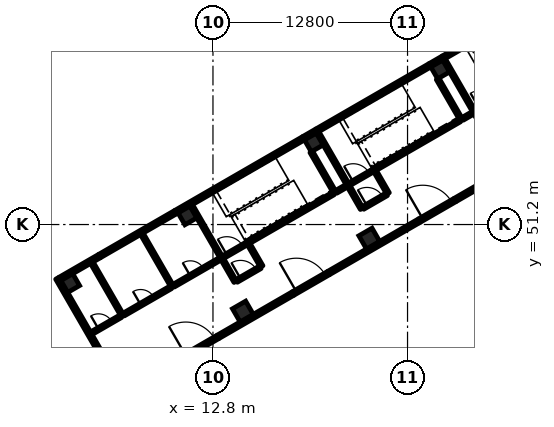
"""IFC4 building model, lengths in metres.
Left out: names, types, materials, properties, quantities, classifications, styles, units other than length and angle.
Written with IfcOpenShell. Run it as: python <this file> out.ifc"""

import sys

from ifc_helpers import new_model, si_unit, direction, frame, frame_2d, origin, origin_2d, place, context, subcontext, project, spatial, rectangle, extrude, element, fill, save


model = new_model("IFC4")
c1 = context("Model", 3, precision=1e-05, world=origin(), true_north=direction((0.0, 1.0)))
c2 = subcontext(c1, "Body", "Model", "MODEL_VIEW")
j1 = project(units=[si_unit("LENGTHUNIT", "METRE"), si_unit("PLANEANGLEUNIT", "RADIAN")], contexts=[c1])
p1 = place(None, origin())
s1 = spatial("IfcSite", under=j1, at=p1, CompositionType="ELEMENT")
p2 = place(p1, origin())
s2 = spatial("IfcBuilding", under=s1, at=p2, CompositionType="ELEMENT")
p3 = place(p2, frame((0.0, 0.0, 6.0)))
s3 = spatial("IfcBuildingStorey", under=s2, at=p3, CompositionType="ELEMENT", Elevation=6.0)
for number, where, z_axis, x_axis in (
    (1, (14.768, 45.477, 0.0), (0.0, 0.0, 1.0), (-0.5, 0.866, 0.0)),
    (2, (23.082, 50.277, 0.0), (0.0, 0.0, 1.0), (-0.5, 0.866, 0.0)),
):
    element("IfcColumn", number, at=place(p3, frame(where, z_axis=z_axis, x_axis=x_axis)), inside=s3, PredefinedType="COLUMN", context=c2, shape_type="SweptSolid", body=[
        extrude(rectangle(XDim=1.0, YDim=1.0, at=origin_2d()), origin(), (0.0, 0.0, 1.0), 5.4),
    ])
for number, where, z_axis, x_axis in (
    (3, (3.41, 47.349, 0.0), (0.0, 0.0, 1.0), (-0.5, 0.866, 0.0)),
    (4, (11.118, 51.799, 0.0), (0.0, 0.0, 1.0), (-0.5, 0.866, 0.0)),
    (5, (19.432, 56.599, 0.0), (0.0, 0.0, 1.0), (-0.5, 0.866, 0.0)),
    (6, (27.746, 61.399, 0.0), (0.0, 0.0, 1.0), (-0.5, 0.866, 0.0)),
):
    element("IfcColumn", number, at=place(p3, frame(where, z_axis=z_axis, x_axis=x_axis)), inside=s3, PredefinedType="COLUMN", context=c2, shape_type="SweptSolid", body=[
        extrude(rectangle(XDim=0.9, YDim=0.9, at=origin_2d()), origin(), (0.0, 0.0, 1.0), 5.4),
    ])
p4 = place(p3, frame((7.719, 38.737, 0.0), z_axis=(0.0, 0.0, 1.0), x_axis=(-0.500001855621, 0.866024332438, 0.0)))
e7 = element("IfcWall", 7, at=p4, inside=s3, PredefinedType="SOLIDWALL", context=c2, shape_type="SweptSolid", body=[
    extrude(rectangle(XDim=10.312, YDim=0.25, at=frame_2d((5.156, 0.0))), origin(), (0.0, 0.0, 1.0), 5.1),
])
p5 = place(p3, frame((2.733, 47.622, 0.0), z_axis=(0.0, 0.0, 1.0), x_axis=(0.866010750942, 0.50002537861, 0.0)))
e8 = element("IfcWall", 8, at=p5, inside=s3, PredefinedType="SOLIDWALL", context=c2, shape_type="SweptSolid", body=[
    extrude(rectangle(XDim=3.0, YDim=0.25, at=frame_2d((1.5, 0.0))), origin(), (0.0, 0.0, 1.0), 5.1),
])
p6 = place(p3, frame((5.331, 49.122, 0.0), z_axis=(0.0, 0.0, 1.0), x_axis=(0.866036343161, 0.499981051965, 0.0)))
e9 = element("IfcWall", 9, at=p6, inside=s3, PredefinedType="SOLIDWALL", context=c2, shape_type="SweptSolid", body=[
    extrude(rectangle(XDim=5.775, YDim=0.25, at=frame_2d((2.888, 0.0))), origin(), (0.0, 0.0, 1.0), 5.1),
])
p7 = place(p6, frame((0.25, 0.0, 0.9)))
e10 = element("IfcOpeningElement", 10, at=p7, cuts=e9, PredefinedType="OPENING", context=c2, shape_type="SweptSolid", body=[
    extrude(rectangle(XDim=2.0, YDim=1.8, at=frame_2d((1.0, 0.9))), frame((0.0, 0.135, 0.0), z_axis=(0.0, -1.0, 0.0), x_axis=(1.0, 0.0, 0.0)), (0.0, 0.0, 1.0), 0.27),
])
p8 = place(p6, frame((3.525, 0.0, 0.9)))
e11 = element("IfcOpeningElement", 11, at=p8, cuts=e9, PredefinedType="OPENING", context=c2, shape_type="SweptSolid", body=[
    extrude(rectangle(XDim=2.0, YDim=1.8, at=frame_2d((1.0, 0.9))), frame((0.0, 0.135, 0.0), z_axis=(0.0, -1.0, 0.0), x_axis=(1.0, 0.0, 0.0)), (0.0, 0.0, 1.0), 0.27),
])
p9 = place(p3, frame((10.333, 52.009, 0.0), z_axis=(0.0, 0.0, 1.0), x_axis=(0.866023797515, 0.500002782129, 0.0)))
e12 = element("IfcWall", 12, at=p9, inside=s3, PredefinedType="SOLIDWALL", context=c2, shape_type="SweptSolid", body=[
    extrude(rectangle(XDim=9.725, YDim=0.25, at=frame_2d((4.863, 0.0))), origin(), (0.0, 0.0, 1.0), 5.1),
])
p10 = place(p3, frame((19.621, 57.372, 0.0), z_axis=(0.0, 0.0, 1.0), x_axis=(0.866021068297, 0.500007509209, 0.0)))
e13 = element("IfcWall", 13, at=p10, inside=s3, PredefinedType="SOLIDWALL", context=c2, shape_type="SweptSolid", body=[
    extrude(rectangle(XDim=8.6, YDim=0.25, at=frame_2d((4.3, 0.0))), origin(), (0.0, 0.0, 1.0), 5.1),
])
p11 = place(p3, frame((27.935, 62.172, 0.0), z_axis=(0.0, 0.0, 1.0), x_axis=(0.86604045752, 0.499973925258, 0.0)))
e14 = element("IfcWall", 14, at=p11, inside=s3, PredefinedType="SOLIDWALL", context=c2, shape_type="SweptSolid", body=[
    extrude(rectangle(XDim=8.6, YDim=0.25, at=frame_2d((4.3, 0.0))), origin(), (0.0, 0.0, 1.0), 5.1),
])
for number, where, z_axis, x_axis in (
    (15, (18.755, 56.872, 0.0), (0.0, 0.0, 1.0), (0.866, 0.5, 0.0)),
    (16, (27.069, 61.672, 0.0), (0.0, 0.0, 1.0), (0.866, 0.5, 0.0)),
):
    element("IfcWall", number, at=place(p3, frame(where, z_axis=z_axis, x_axis=x_axis)), inside=s3, PredefinedType="SOLIDWALL", context=c2, shape_type="SweptSolid", body=[
        extrude(rectangle(XDim=1.0, YDim=0.25, at=frame_2d((0.5, 0.0))), origin(), (0.0, 0.0, 1.0), 5.1),
    ])
p12 = place(p3, frame((13.369, 49.0, 0.0), z_axis=(0.0, 0.0, 1.0), x_axis=(-0.50002537861, 0.866010750942, 0.0)))
e17 = element("IfcWall", 17, at=p12, inside=s3, PredefinedType="SOLIDWALL", context=c2, shape_type="SweptSolid", body=[
    extrude(rectangle(XDim=4.0, YDim=0.2, at=frame_2d((2.0, 0.0))), origin(), (0.0, 0.0, 1.0), 5.1),
])
p13 = place(p3, frame((20.817, 53.299, 0.0), z_axis=(0.0, 0.0, 1.0), x_axis=(-0.49999285859, 0.86602952684, 0.0)))
e18 = element("IfcWall", 18, at=p13, inside=s3, PredefinedType="SOLIDWALL", context=c2, shape_type="SweptSolid", body=[
    extrude(rectangle(XDim=3.1, YDim=0.2, at=frame_2d((1.55, 0.0))), origin(), (0.0, 0.0, 1.0), 5.1),
])
p14 = place(p3, frame((21.683, 53.799, 0.0), z_axis=(0.0, 0.0, 1.0), x_axis=(-0.49999894854, 0.866026010844, 0.0)))
e19 = element("IfcWall", 19, at=p14, inside=s3, PredefinedType="SOLIDWALL", context=c2, shape_type="SweptSolid", body=[
    extrude(rectangle(XDim=4.0, YDim=0.2, at=frame_2d((2.0, 0.0))), origin(), (0.0, 0.0, 1.0), 5.1),
])
p15 = place(p3, frame((29.131, 58.099, 0.0), z_axis=(0.0, 0.0, 1.0), x_axis=(-0.49999285859, 0.86602952684, 0.0)))
e20 = element("IfcWall", 20, at=p15, inside=s3, PredefinedType="SOLIDWALL", context=c2, shape_type="SweptSolid", body=[
    extrude(rectangle(XDim=3.1, YDim=0.2, at=frame_2d((1.55, 0.0))), origin(), (0.0, 0.0, 1.0), 5.1),
])
p16 = place(p3, frame((29.997, 58.599, 0.0), z_axis=(0.0, 0.0, 1.0), x_axis=(-0.49999894854, 0.866026010844, 0.0)))
e21 = element("IfcWall", 21, at=p16, inside=s3, PredefinedType="SOLIDWALL", context=c2, shape_type="SweptSolid", body=[
    extrude(rectangle(XDim=4.0, YDim=0.2, at=frame_2d((2.0, 0.0))), origin(), (0.0, 0.0, 1.0), 5.1),
])
p17 = place(p3, frame((13.456, 49.049, 0.0), z_axis=(0.0, 0.0, 1.0), x_axis=(0.866036909293, 0.499980071345, 0.0)))
e22 = element("IfcWall", 22, at=p17, inside=s3, PredefinedType="SOLIDWALL", context=c2, shape_type="SweptSolid", body=[
    extrude(rectangle(XDim=1.75, YDim=0.2, at=frame_2d((0.875, 0.0))), origin(), (0.0, 0.0, 1.0), 5.1),
])
p18 = place(p17, frame((0.3, 0.0, 0.0)))
e23 = element("IfcOpeningElement", 23, at=p18, cuts=e22, PredefinedType="OPENING", context=c2, shape_type="SweptSolid", body=[
    extrude(rectangle(XDim=1.2, YDim=2.1, at=frame_2d((0.6, 1.05))), frame((0.0, 0.11, 0.0), z_axis=(0.0, -1.0, 0.0), x_axis=(1.0, 0.0, 0.0)), (0.0, 0.0, 1.0), 0.22),
])
p19 = place(p3, frame((14.972, 49.924, 0.0), z_axis=(0.0, 0.0, 1.0), x_axis=(0.86601134256, 0.500024353964, 0.0)))
e24 = element("IfcWall", 24, at=p19, inside=s3, PredefinedType="SOLIDWALL", context=c2, shape_type="SweptSolid", body=[
    extrude(rectangle(XDim=6.65, YDim=0.2, at=frame_2d((3.325, 0.0))), origin(), (0.0, 0.0, 1.0), 5.1),
])
p20 = place(p3, frame((21.77, 53.849, 0.0), z_axis=(0.0, 0.0, 1.0), x_axis=(0.866002029911, 0.500040482552, 0.0)))
e25 = element("IfcWall", 25, at=p20, inside=s3, PredefinedType="SOLIDWALL", context=c2, shape_type="SweptSolid", body=[
    extrude(rectangle(XDim=1.75, YDim=0.2, at=frame_2d((0.875, 0.0))), origin(), (0.0, 0.0, 1.0), 5.1),
])
p21 = place(p20, frame((0.3, 0.0, 0.0)))
e26 = element("IfcOpeningElement", 26, at=p21, cuts=e25, PredefinedType="OPENING", context=c2, shape_type="SweptSolid", body=[
    extrude(rectangle(XDim=1.2, YDim=2.1, at=frame_2d((0.6, 1.05))), frame((0.0, 0.11, 0.0), z_axis=(0.0, -1.0, 0.0), x_axis=(1.0, 0.0, 0.0)), (0.0, 0.0, 1.0), 0.22),
])
p22 = place(p3, frame((23.285, 54.724, 0.0), z_axis=(0.0, 0.0, 1.0), x_axis=(0.866027239912, 0.49999681972, 0.0)))
e27 = element("IfcWall", 27, at=p22, inside=s3, PredefinedType="SOLIDWALL", context=c2, shape_type="SweptSolid", body=[
    extrude(rectangle(XDim=6.65, YDim=0.2, at=frame_2d((3.325, 0.0))), origin(), (0.0, 0.0, 1.0), 5.1),
])
for number, where, z_axis, x_axis in (
    (28, (14.27, 47.441, 0.0), (0.0, 0.0, 1.0), (-0.5, 0.866, 0.0)),
    (29, (16.001, 48.441, 0.0), (0.0, 0.0, 1.0), (-0.5, 0.866, 0.0)),
    (30, (22.583, 52.24, 0.0), (0.0, 0.0, 1.0), (-0.5, 0.866, 0.0)),
):
    element("IfcWall", number, at=place(p3, frame(where, z_axis=z_axis, x_axis=x_axis)), inside=s3, PredefinedType="PARTITIONING", context=c2, shape_type="SweptSolid", body=[
        extrude(rectangle(XDim=1.7, YDim=0.2, at=frame_2d((0.85, 0.0))), origin(), (0.0, 0.0, 1.0), 4.5),
    ])
p23 = place(p3, frame((24.315, 53.24, 0.0), z_axis=(0.0, 0.0, 1.0), x_axis=(-0.500000056704, 0.866025371046, 0.0)))
e31 = element("IfcWall", 31, at=p23, inside=s3, PredefinedType="PARTITIONING", context=c2, shape_type="SweptSolid", body=[
    extrude(rectangle(XDim=1.7, YDim=0.2, at=frame_2d((0.85, 0.0))), origin(), (0.0, 0.0, 1.0), 4.5),
])
p24 = place(p3, frame((30.897, 57.041, 0.0), z_axis=(0.0, 0.0, 1.0), x_axis=(-0.500062241894, 0.865989465428, 0.0)))
e32 = element("IfcWall", 32, at=p24, inside=s3, PredefinedType="PARTITIONING", context=c2, shape_type="SweptSolid", body=[
    extrude(rectangle(XDim=1.7, YDim=0.2, at=frame_2d((0.85, 0.0))), origin(), (0.0, 0.0, 1.0), 4.5),
])
p25 = place(p3, frame((14.356, 47.49, 0.0), z_axis=(0.0, 0.0, 1.0), x_axis=(0.865955154139, 0.50012165622, 0.0)))
e33 = element("IfcWall", 33, at=p25, inside=s3, PredefinedType="PARTITIONING", context=c2, shape_type="SweptSolid", body=[
    extrude(rectangle(XDim=1.8, YDim=0.2, at=frame_2d((0.9, 0.0))), origin(), (0.0, 0.0, 1.0), 4.5),
])
p26 = place(p25, frame((0.3, 0.0, 0.0)))
e34 = element("IfcOpeningElement", 34, at=p26, cuts=e33, PredefinedType="OPENING", context=c2, shape_type="SweptSolid", body=[
    extrude(rectangle(XDim=1.2, YDim=2.1, at=frame_2d((0.6, 1.05))), frame((0.0, 0.11, 0.0), z_axis=(0.0, -1.0, 0.0), x_axis=(1.0, 0.0, 0.0)), (0.0, 0.0, 1.0), 0.22),
])
p27 = place(p3, frame((22.67, 52.291, 0.0), z_axis=(0.0, 0.0, 1.0), x_axis=(0.865989075817, 0.500062916607, 0.0)))
e35 = element("IfcWall", 35, at=p27, inside=s3, PredefinedType="PARTITIONING", context=c2, shape_type="SweptSolid", body=[
    extrude(rectangle(XDim=1.8, YDim=0.2, at=frame_2d((0.9, 0.0))), origin(), (0.0, 0.0, 1.0), 4.5),
])
p28 = place(p27, frame((0.3, 0.0, 0.0)))
e36 = element("IfcOpeningElement", 36, at=p28, cuts=e35, PredefinedType="OPENING", context=c2, shape_type="SweptSolid", body=[
    extrude(rectangle(XDim=1.2, YDim=2.1, at=frame_2d((0.6, 1.05))), frame((0.0, 0.11, 0.0), z_axis=(0.0, -1.0, 0.0), x_axis=(1.0, 0.0, 0.0)), (0.0, 0.0, 1.0), 0.22),
])
p29 = place(p3, frame((10.794, 42.461, 0.0), z_axis=(0.0, 0.0, 1.0), x_axis=(0.866059108428, 0.4999416173, 0.0)))
e37 = element("IfcWall", 37, at=p29, inside=s3, PredefinedType="SOLIDWALL", context=c2, shape_type="SweptSolid", body=[
    extrude(rectangle(XDim=2.7, YDim=0.25, at=frame_2d((1.35, 0.0))), origin(), (0.0, 0.0, 1.0), 4.5),
])
p30 = place(p29, frame((0.25, 0.0, 0.0)))
e38 = element("IfcOpeningElement", 38, at=p30, cuts=e37, PredefinedType="OPENING", context=c2, shape_type="SweptSolid", body=[
    extrude(rectangle(XDim=2.2, YDim=2.1, at=frame_2d((1.1, 1.05))), frame((0.0, 0.135, 0.0), z_axis=(0.0, -1.0, 0.0), x_axis=(1.0, 0.0, 0.0)), (0.0, 0.0, 1.0), 0.27),
])
p31 = place(p3, frame((13.132, 43.811, 0.0), z_axis=(0.0, 0.0, 1.0), x_axis=(0.866015111908, 0.50001782563, 0.0)))
e39 = element("IfcWall", 39, at=p31, inside=s3, PredefinedType="SOLIDWALL", context=c2, shape_type="SweptSolid", body=[
    extrude(rectangle(XDim=5.7, YDim=0.25, at=frame_2d((2.85, 0.0))), origin(), (0.0, 0.0, 1.0), 4.5),
])
p32 = place(p3, frame((18.068, 46.661, 0.0), z_axis=(0.0, 0.0, 1.0), x_axis=(0.866059108428, 0.4999416173, 0.0)))
e40 = element("IfcWall", 40, at=p32, inside=s3, PredefinedType="SOLIDWALL", context=c2, shape_type="SweptSolid", body=[
    extrude(rectangle(XDim=2.7, YDim=0.25, at=frame_2d((1.35, 0.0))), origin(), (0.0, 0.0, 1.0), 4.5),
])
p33 = place(p32, frame((0.25, 0.0, 0.0)))
e41 = element("IfcOpeningElement", 41, at=p33, cuts=e40, PredefinedType="OPENING", context=c2, shape_type="SweptSolid", body=[
    extrude(rectangle(XDim=2.2, YDim=2.1, at=frame_2d((1.1, 1.05))), frame((0.0, 0.135, 0.0), z_axis=(0.0, -1.0, 0.0), x_axis=(1.0, 0.0, 0.0)), (0.0, 0.0, 1.0), 0.27),
])
p34 = place(p3, frame((20.407, 48.01, 0.0), z_axis=(0.0, 0.0, 1.0), x_axis=(0.866013532718, 0.500020560727, 0.0)))
e42 = element("IfcWall", 42, at=p34, inside=s3, PredefinedType="SOLIDWALL", context=c2, shape_type="SweptSolid", body=[
    extrude(rectangle(XDim=6.9, YDim=0.25, at=frame_2d((3.45, 0.0))), origin(), (0.0, 0.0, 1.0), 4.5),
])
p35 = place(p3, frame((26.382, 51.461, 0.0), z_axis=(0.0, 0.0, 1.0), x_axis=(0.866036505625, 0.499980770555, 0.0)))
e43 = element("IfcWall", 43, at=p35, inside=s3, PredefinedType="SOLIDWALL", context=c2, shape_type="SweptSolid", body=[
    extrude(rectangle(XDim=2.7, YDim=0.25, at=frame_2d((1.35, 0.0))), origin(), (0.0, 0.0, 1.0), 4.5),
])
p36 = place(p35, frame((0.25, 0.0, 0.0)))
e44 = element("IfcOpeningElement", 44, at=p36, cuts=e43, PredefinedType="OPENING", context=c2, shape_type="SweptSolid", body=[
    extrude(rectangle(XDim=2.2, YDim=2.1, at=frame_2d((1.1, 1.05))), frame((0.0, 0.135, 0.0), z_axis=(0.0, -1.0, 0.0), x_axis=(1.0, 0.0, 0.0)), (0.0, 0.0, 1.0), 0.27),
])
p37 = place(p3, frame((28.72, 52.811, 0.0), z_axis=(0.0, 0.0, 1.0), x_axis=(0.866028853923, 0.499994024137, 0.0)))
e45 = element("IfcWall", 45, at=p37, inside=s3, PredefinedType="SOLIDWALL", context=c2, shape_type="SweptSolid", body=[
    extrude(rectangle(XDim=6.9, YDim=0.25, at=frame_2d((3.45, 0.0))), origin(), (0.0, 0.0, 1.0), 4.5),
])
p38 = place(p3, frame((6.831, 45.224, 0.0), z_axis=(0.0, 0.0, 1.0), x_axis=(-0.49999894854, 0.866026010844, 0.0)))
e46 = element("IfcWall", 46, at=p38, inside=s3, PredefinedType="PARTITIONING", context=c2, shape_type="SweptSolid", body=[
    extrude(rectangle(XDim=4.0, YDim=0.2, at=frame_2d((2.0, 0.0))), origin(), (0.0, 0.0, 1.0), 4.5),
])
p39 = place(p3, frame((4.796, 44.049, 0.0), z_axis=(0.0, 0.0, 1.0), x_axis=(0.866017533419, 0.500013631625, 0.0)))
e47 = element("IfcWall", 47, at=p39, inside=s3, PredefinedType="PARTITIONING", context=c2, shape_type="SweptSolid", body=[
    extrude(rectangle(XDim=2.25, YDim=0.2, at=frame_2d((1.125, 0.0))), origin(), (0.0, 0.0, 1.0), 4.5),
])
p40 = place(p39, frame((0.55, 0.0, 0.0)))
e48 = element("IfcOpeningElement", 48, at=p40, cuts=e47, PredefinedType="OPENING", context=c2, shape_type="SweptSolid", body=[
    extrude(rectangle(XDim=1.0, YDim=2.1, at=frame_2d((0.5, 1.05))), frame((0.0, 0.11, 0.0), z_axis=(0.0, -1.0, 0.0), x_axis=(1.0, 0.0, 0.0)), (0.0, 0.0, 1.0), 0.22),
])
p41 = place(p3, frame((10.122, 47.125, 0.0), z_axis=(0.0, 0.0, 1.0), x_axis=(-0.50002537861, 0.866010750942, 0.0)))
e49 = element("IfcWall", 49, at=p41, inside=s3, PredefinedType="PARTITIONING", context=c2, shape_type="SweptSolid", body=[
    extrude(rectangle(XDim=4.0, YDim=0.2, at=frame_2d((2.0, 0.0))), origin(), (0.0, 0.0, 1.0), 4.5),
])
p42 = place(p3, frame((6.917, 45.274, 0.0), z_axis=(0.0, 0.0, 1.0), x_axis=(0.866035395735, 0.499982693035, 0.0)))
e50 = element("IfcWall", 50, at=p42, inside=s3, PredefinedType="PARTITIONING", context=c2, shape_type="SweptSolid", body=[
    extrude(rectangle(XDim=3.6, YDim=0.2, at=frame_2d((1.8, 0.0))), origin(), (0.0, 0.0, 1.0), 4.5),
])
p43 = place(p42, frame((1.3, 0.0, 0.0)))
e51 = element("IfcOpeningElement", 51, at=p43, cuts=e50, PredefinedType="OPENING", context=c2, shape_type="SweptSolid", body=[
    extrude(rectangle(XDim=1.0, YDim=2.1, at=frame_2d((0.5, 1.05))), frame((0.0, 0.11, 0.0), z_axis=(0.0, -1.0, 0.0), x_axis=(1.0, 0.0, 0.0)), (0.0, 0.0, 1.0), 0.22),
])
p44 = place(p3, frame((10.208, 47.174, 0.0), z_axis=(0.0, 0.0, 1.0), x_axis=(0.866012656725, 0.500022077904, 0.0)))
e52 = element("IfcWall", 52, at=p44, inside=s3, PredefinedType="PARTITIONING", context=c2, shape_type="SweptSolid", body=[
    extrude(rectangle(XDim=3.55, YDim=0.2, at=frame_2d((1.775, 0.0))), origin(), (0.0, 0.0, 1.0), 4.5),
])
p45 = place(p44, frame((1.275, 0.0, 0.0)))
e53 = element("IfcOpeningElement", 53, at=p45, cuts=e52, PredefinedType="OPENING", context=c2, shape_type="SweptSolid", body=[
    extrude(rectangle(XDim=1.0, YDim=2.1, at=frame_2d((0.5, 1.05))), frame((0.0, 0.11, 0.0), z_axis=(0.0, -1.0, 0.0), x_axis=(1.0, 0.0, 0.0)), (0.0, 0.0, 1.0), 0.22),
])
p46 = place(p3, frame((20.904, 53.349, 0.0), z_axis=(0.0, 0.0, 1.0), x_axis=(0.865961984968, 0.500109828528, 0.0)))
e54 = element("IfcWall", 54, at=p46, inside=s3, PredefinedType="PARTITIONING", context=c2, shape_type="SweptSolid", body=[
    extrude(rectangle(XDim=0.8, YDim=0.2, at=frame_2d((0.4, 0.0))), origin(), (0.0, 0.0, 1.0), 4.5),
])
p47 = place(p3, frame((29.218, 58.149, 0.0), z_axis=(0.0, 0.0, 1.0), x_axis=(0.866017831539, 0.500013115284, 0.0)))
e55 = element("IfcWall", 55, at=p47, inside=s3, PredefinedType="PARTITIONING", context=c2, shape_type="SweptSolid", body=[
    extrude(rectangle(XDim=0.8, YDim=0.2, at=frame_2d((0.4, 0.0))), origin(), (0.0, 0.0, 1.0), 4.5),
])
p48 = place(p7, origin())
e56 = element("IfcWindow", 56, at=p48, inside=s3, PartitioningType="SINGLE_PANEL", PredefinedType="WINDOW", context=c2, shape_type="SweptSolid", body=[
    extrude(rectangle(XDim=2.0, YDim=1.8, at=frame_2d((1.0, 0.9))), frame((0.0, 0.03, 0.0), z_axis=(0.0, -1.0, 0.0), x_axis=(1.0, 0.0, 0.0)), (0.0, 0.0, 1.0), 0.06),
])
fill(e10, e56)
p49 = place(p8, origin())
e57 = element("IfcWindow", 57, at=p49, inside=s3, PartitioningType="SINGLE_PANEL", PredefinedType="WINDOW", context=c2, shape_type="SweptSolid", body=[
    extrude(rectangle(XDim=2.0, YDim=1.8, at=frame_2d((1.0, 0.9))), frame((0.0, 0.03, 0.0), z_axis=(0.0, -1.0, 0.0), x_axis=(1.0, 0.0, 0.0)), (0.0, 0.0, 1.0), 0.06),
])
fill(e11, e57)
p50 = place(p18, origin())
e58 = element("IfcDoor", 58, at=p50, inside=s3, OperationType="SINGLE_SWING_LEFT", PredefinedType="DOOR", context=c2, shape_type="SweptSolid", body=[
    extrude(rectangle(XDim=1.2, YDim=2.1, at=frame_2d((0.6, 1.05))), frame((0.0, 0.025, 0.0), z_axis=(0.0, -1.0, 0.0), x_axis=(1.0, 0.0, 0.0)), (0.0, 0.0, 1.0), 0.05),
])
fill(e23, e58)
p51 = place(p21, origin())
e59 = element("IfcDoor", 59, at=p51, inside=s3, OperationType="SINGLE_SWING_LEFT", PredefinedType="DOOR", context=c2, shape_type="SweptSolid", body=[
    extrude(rectangle(XDim=1.2, YDim=2.1, at=frame_2d((0.6, 1.05))), frame((0.0, 0.025, 0.0), z_axis=(0.0, -1.0, 0.0), x_axis=(1.0, 0.0, 0.0)), (0.0, 0.0, 1.0), 0.05),
])
fill(e26, e59)
p52 = place(p26, origin())
e60 = element("IfcDoor", 60, at=p52, inside=s3, OperationType="SINGLE_SWING_LEFT", PredefinedType="DOOR", context=c2, shape_type="SweptSolid", body=[
    extrude(rectangle(XDim=1.2, YDim=2.1, at=frame_2d((0.6, 1.05))), frame((0.0, 0.025, 0.0), z_axis=(0.0, -1.0, 0.0), x_axis=(1.0, 0.0, 0.0)), (0.0, 0.0, 1.0), 0.05),
])
fill(e34, e60)
p53 = place(p28, origin())
e61 = element("IfcDoor", 61, at=p53, inside=s3, OperationType="SINGLE_SWING_LEFT", PredefinedType="DOOR", context=c2, shape_type="SweptSolid", body=[
    extrude(rectangle(XDim=1.2, YDim=2.1, at=frame_2d((0.6, 1.05))), frame((0.0, 0.025, 0.0), z_axis=(0.0, -1.0, 0.0), x_axis=(1.0, 0.0, 0.0)), (0.0, 0.0, 1.0), 0.05),
])
fill(e36, e61)
p54 = place(p30, origin())
e62 = element("IfcDoor", 62, at=p54, inside=s3, OperationType="DOUBLE_DOOR_SINGLE_SWING", PredefinedType="DOOR", context=c2, shape_type="SweptSolid", body=[
    extrude(rectangle(XDim=2.2, YDim=2.1, at=frame_2d((1.1, 1.05))), frame((0.0, 0.025, 0.0), z_axis=(0.0, -1.0, 0.0), x_axis=(1.0, 0.0, 0.0)), (0.0, 0.0, 1.0), 0.05),
])
fill(e38, e62)
p55 = place(p33, origin())
e63 = element("IfcDoor", 63, at=p55, inside=s3, OperationType="DOUBLE_DOOR_SINGLE_SWING", PredefinedType="DOOR", context=c2, shape_type="SweptSolid", body=[
    extrude(rectangle(XDim=2.2, YDim=2.1, at=frame_2d((1.1, 1.05))), frame((0.0, 0.025, 0.0), z_axis=(0.0, -1.0, 0.0), x_axis=(1.0, 0.0, 0.0)), (0.0, 0.0, 1.0), 0.05),
])
fill(e41, e63)
p56 = place(p36, origin())
e64 = element("IfcDoor", 64, at=p56, inside=s3, OperationType="DOUBLE_DOOR_SINGLE_SWING", PredefinedType="DOOR", context=c2, shape_type="SweptSolid", body=[
    extrude(rectangle(XDim=2.2, YDim=2.1, at=frame_2d((1.1, 1.05))), frame((0.0, 0.025, 0.0), z_axis=(0.0, -1.0, 0.0), x_axis=(1.0, 0.0, 0.0)), (0.0, 0.0, 1.0), 0.05),
])
fill(e44, e64)
p57 = place(p40, origin())
e65 = element("IfcDoor", 65, at=p57, inside=s3, OperationType="SINGLE_SWING_LEFT", PredefinedType="DOOR", context=c2, shape_type="SweptSolid", body=[
    extrude(rectangle(XDim=1.0, YDim=2.1, at=frame_2d((0.5, 1.05))), frame((0.0, 0.025, 0.0), z_axis=(0.0, -1.0, 0.0), x_axis=(1.0, 0.0, 0.0)), (0.0, 0.0, 1.0), 0.05),
])
fill(e48, e65)
p58 = place(p43, origin())
e66 = element("IfcDoor", 66, at=p58, inside=s3, OperationType="SINGLE_SWING_LEFT", PredefinedType="DOOR", context=c2, shape_type="SweptSolid", body=[
    extrude(rectangle(XDim=1.0, YDim=2.1, at=frame_2d((0.5, 1.05))), frame((0.0, 0.025, 0.0), z_axis=(0.0, -1.0, 0.0), x_axis=(1.0, 0.0, 0.0)), (0.0, 0.0, 1.0), 0.05),
])
fill(e51, e66)
p59 = place(p45, origin())
e67 = element("IfcDoor", 67, at=p59, inside=s3, OperationType="SINGLE_SWING_LEFT", PredefinedType="DOOR", context=c2, shape_type="SweptSolid", body=[
    extrude(rectangle(XDim=1.0, YDim=2.1, at=frame_2d((0.5, 1.05))), frame((0.0, 0.025, 0.0), z_axis=(0.0, -1.0, 0.0), x_axis=(1.0, 0.0, 0.0)), (0.0, 0.0, 1.0), 0.05),
])
fill(e53, e67)
save(model, sys.argv[1])
